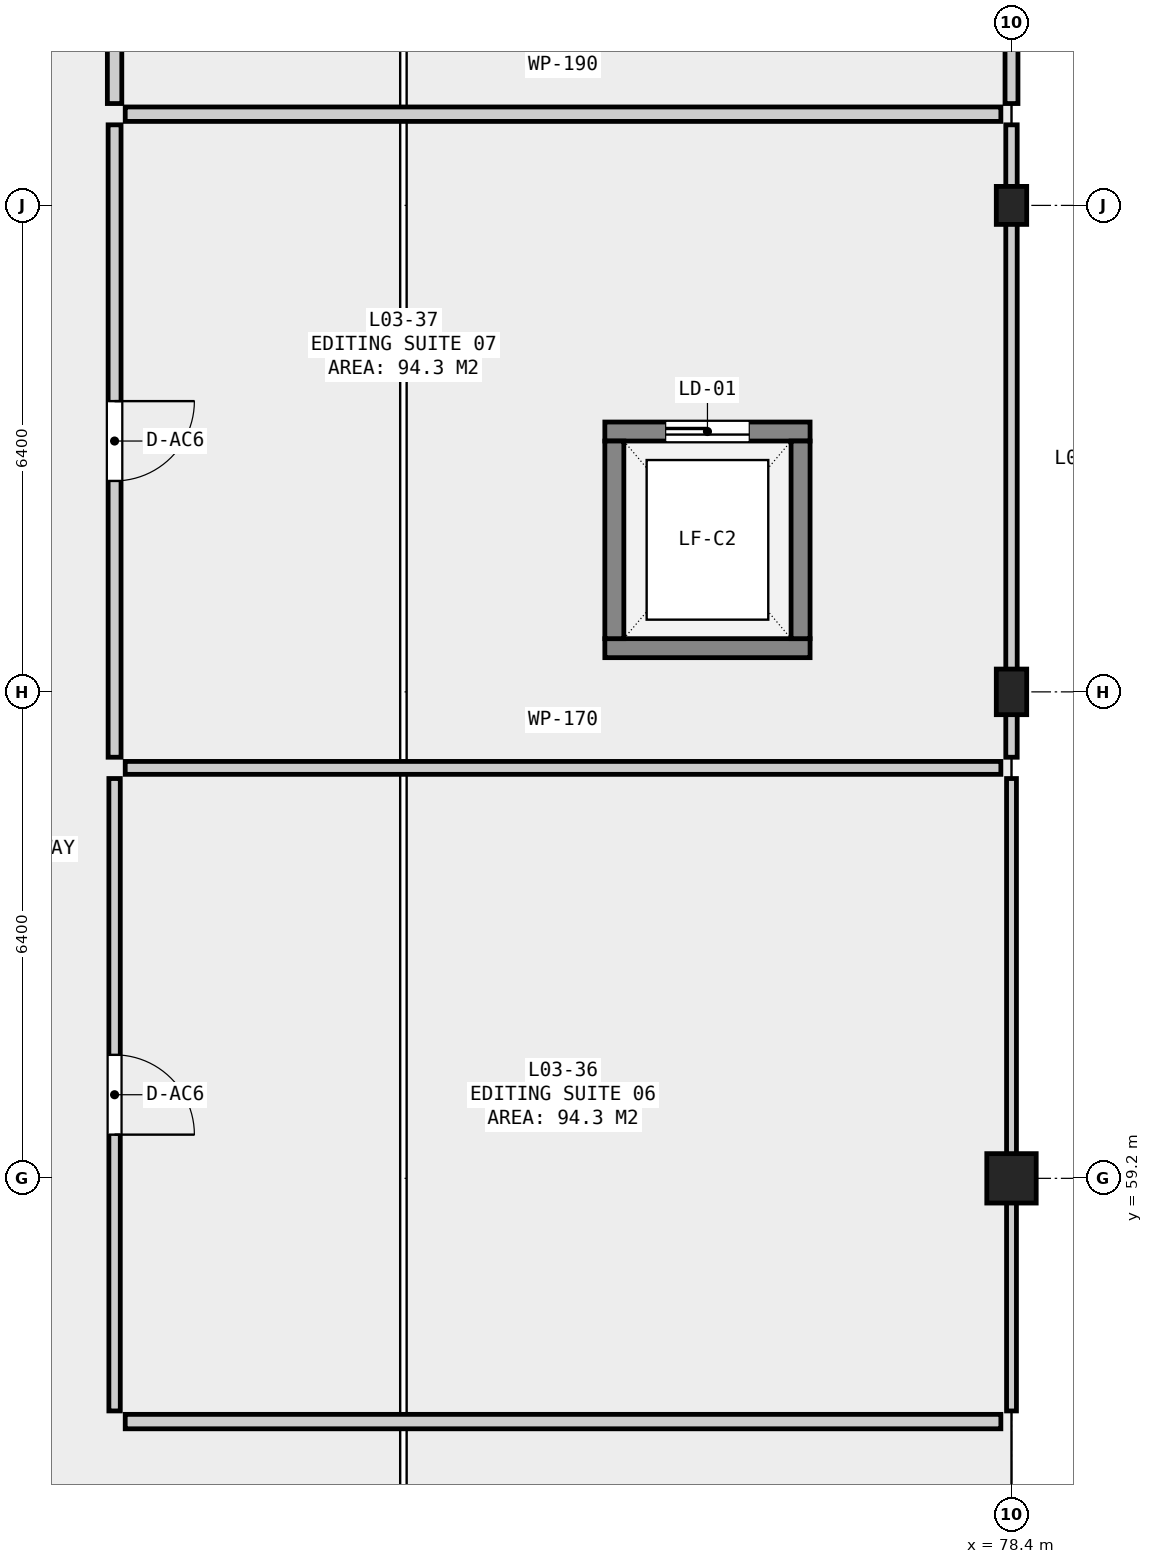
"""IFC4 building model, lengths in metres.
Left out: names, types, materials, properties, quantities, classifications, styles, units other than length and angle.
Written with IfcOpenShell. Run it as: python <this file> out.ifc"""

import sys

from ifc_helpers import new_model, si_unit, direction, frame, frame_2d, origin, origin_2d, place, context, subcontext, project, spatial, rectangle, extrude, element, fill, save


model = new_model("IFC4")
c1 = context("Model", 3, precision=1e-05, world=origin(), true_north=direction((0.0, 1.0)))
c2 = subcontext(c1, "Body", "Model", "MODEL_VIEW")
j1 = project(units=[si_unit("LENGTHUNIT", "METRE"), si_unit("PLANEANGLEUNIT", "RADIAN")], contexts=[c1])
p1 = place(None, origin())
s1 = spatial("IfcSite", under=j1, at=p1, CompositionType="ELEMENT")
p2 = place(p1, origin())
s2 = spatial("IfcBuilding", under=s1, at=p2, CompositionType="ELEMENT")
p3 = place(p2, frame((0.0, 0.0, 15.6)))
s3 = spatial("IfcBuildingStorey", under=s2, at=p3, CompositionType="ELEMENT", Elevation=15.6)
p4 = place(p3, frame((78.4, 59.2, 0.0), z_axis=(0.0, 0.0, 1.0), x_axis=(1.0, 0.0, 0.0)))
e1 = element("IfcColumn", 1, at=p4, inside=s3, PredefinedType="COLUMN", context=c2, shape_type="SweptSolid", body=[
    extrude(rectangle(XDim=0.65, YDim=0.65, at=origin_2d()), origin(), (0.0, 0.0, 1.0), 4.2),
])
p5 = place(p3, frame((78.4, 65.6, 0.0), z_axis=(0.0, 0.0, 1.0), x_axis=(1.0, 0.0, 0.0)))
e2 = element("IfcColumn", 2, at=p5, inside=s3, PredefinedType="COLUMN", context=c2, shape_type="SweptSolid", body=[
    extrude(rectangle(XDim=0.4, YDim=0.6, at=origin_2d()), origin(), (0.0, 0.0, 1.0), 4.2),
])
p6 = place(p3, frame((78.4, 72.0, 0.0), z_axis=(0.0, 0.0, 1.0), x_axis=(1.0, 0.0, 0.0)))
e3 = element("IfcColumn", 3, at=p6, inside=s3, PredefinedType="COLUMN", context=c2, shape_type="SweptSolid", body=[
    extrude(rectangle(XDim=0.4, YDim=0.5, at=origin_2d()), origin(), (0.0, 0.0, 1.0), 4.2),
])
p7 = place(p3, frame((73.05, 66.175, 0.0), z_axis=(0.0, 0.0, 1.0), x_axis=(1.0, 0.0, 0.0)))
e4 = element("IfcWall", 4, at=p7, inside=s3, PredefinedType="SHEAR", context=c2, shape_type="SweptSolid", body=[
    extrude(rectangle(XDim=2.7, YDim=0.25, at=frame_2d((1.35, 0.0))), origin(), (0.0, 0.0, 1.0), 3.9),
])
p8 = place(p3, frame((73.05, 69.025, 0.0), z_axis=(0.0, 0.0, 1.0), x_axis=(1.0, 0.0, 0.0)))
e5 = element("IfcWall", 5, at=p8, inside=s3, PredefinedType="SHEAR", context=c2, shape_type="SweptSolid", body=[
    extrude(rectangle(XDim=2.7, YDim=0.25, at=frame_2d((1.35, 0.0))), origin(), (0.0, 0.0, 1.0), 3.9),
])
p9 = place(p8, frame((0.8, 0.0, 0.0)))
e6 = element("IfcOpeningElement", 6, at=p9, cuts=e5, PredefinedType="OPENING", context=c2, shape_type="SweptSolid", body=[
    extrude(rectangle(XDim=1.1, YDim=2.15, at=frame_2d((0.55, 1.075))), frame((0.0, 0.137, 0.0), z_axis=(0.0, -1.0, 0.0), x_axis=(1.0, 0.0, 0.0)), (0.0, 0.0, 1.0), 0.274),
])
for number, where, z_axis, x_axis in (
    (7, (73.175, 66.3, 0.0), (0.0, 0.0, 1.0), (0.0, 1.0, 0.0)),
    (8, (75.625, 66.3, 0.0), (0.0, 0.0, 1.0), (0.0, 1.0, 0.0)),
):
    element("IfcWall", number, at=place(p3, frame(where, z_axis=z_axis, x_axis=x_axis)), inside=s3, PredefinedType="SHEAR", context=c2, shape_type="SweptSolid", body=[
        extrude(rectangle(XDim=2.6, YDim=0.25, at=frame_2d((1.3, 0.0))), origin(), (0.0, 0.0, 1.0), 3.9),
    ])
p10 = place(p3, frame((66.74, 56.0, 0.0), z_axis=(0.0, 0.0, 1.0), x_axis=(1.0, 0.0, 0.0)))
e9 = element("IfcWall", 9, at=p10, inside=s3, PredefinedType="PARTITIONING", context=c2, shape_type="SweptSolid", body=[
    extrude(rectangle(XDim=11.52, YDim=0.19, at=frame_2d((5.76, 0.0))), origin(), (0.0, 0.0, 1.0), 3.9),
])
p11 = place(p3, frame((66.74, 64.6, 0.0), z_axis=(0.0, 0.0, 1.0), x_axis=(1.0, 0.0, 0.0)))
e10 = element("IfcWall", 10, at=p11, inside=s3, PredefinedType="PARTITIONING", context=c2, shape_type="SweptSolid", body=[
    extrude(rectangle(XDim=11.52, YDim=0.17, at=frame_2d((5.76, 0.0))), origin(), (0.0, 0.0, 1.0), 3.9),
])
p12 = place(p3, frame((66.6, 56.14, 0.0), z_axis=(0.0, 0.0, 1.0), x_axis=(0.0, 1.0, 0.0)))
e11 = element("IfcWall", 11, at=p12, inside=s3, PredefinedType="PARTITIONING", context=c2, shape_type="SweptSolid", body=[
    extrude(rectangle(XDim=8.32, YDim=0.15, at=frame_2d((4.16, 0.0))), origin(), (0.0, 0.0, 1.0), 3.9),
])
p13 = place(p12, frame((3.635, 0.0, 0.0)))
e12 = element("IfcOpeningElement", 12, at=p13, cuts=e11, PredefinedType="OPENING", context=c2, shape_type="SweptSolid", body=[
    extrude(rectangle(XDim=1.05, YDim=2.15, at=frame_2d((0.525, 1.075))), frame((0.0, 0.087, 0.0), z_axis=(0.0, -1.0, 0.0), x_axis=(1.0, 0.0, 0.0)), (0.0, 0.0, 1.0), 0.174),
])
p14 = place(p3, frame((78.4, 56.14, 0.0), z_axis=(0.0, 0.0, 1.0), x_axis=(0.0, 1.0, 0.0)))
e13 = element("IfcWall", 13, at=p14, inside=s3, PredefinedType="PARTITIONING", context=c2, shape_type="SweptSolid", body=[
    extrude(rectangle(XDim=8.32, YDim=0.13, at=frame_2d((4.16, 0.0))), origin(), (0.0, 0.0, 1.0), 3.3),
])
p15 = place(p3, frame((66.74, 73.2, 0.0), z_axis=(0.0, 0.0, 1.0), x_axis=(1.0, 0.0, 0.0)))
e14 = element("IfcWall", 14, at=p15, inside=s3, PredefinedType="PARTITIONING", context=c2, shape_type="SweptSolid", body=[
    extrude(rectangle(XDim=11.52, YDim=0.19, at=frame_2d((5.76, 0.0))), origin(), (0.0, 0.0, 1.0), 3.9),
])
p16 = place(p3, frame((66.6, 64.74, 0.0), z_axis=(0.0, 0.0, 1.0), x_axis=(0.0, 1.0, 0.0)))
e15 = element("IfcWall", 15, at=p16, inside=s3, PredefinedType="PARTITIONING", context=c2, shape_type="SweptSolid", body=[
    extrude(rectangle(XDim=8.32, YDim=0.17, at=frame_2d((4.16, 0.0))), origin(), (0.0, 0.0, 1.0), 3.9),
])
p17 = place(p16, frame((3.635, 0.0, 0.0)))
e16 = element("IfcOpeningElement", 16, at=p17, cuts=e15, PredefinedType="OPENING", context=c2, shape_type="SweptSolid", body=[
    extrude(rectangle(XDim=1.05, YDim=2.15, at=frame_2d((0.525, 1.075))), frame((0.0, 0.097, 0.0), z_axis=(0.0, -1.0, 0.0), x_axis=(1.0, 0.0, 0.0)), (0.0, 0.0, 1.0), 0.194),
])
p18 = place(p3, frame((78.4, 64.74, 0.0), z_axis=(0.0, 0.0, 1.0), x_axis=(0.0, 1.0, 0.0)))
e17 = element("IfcWall", 17, at=p18, inside=s3, PredefinedType="PARTITIONING", context=c2, shape_type="SweptSolid", body=[
    extrude(rectangle(XDim=8.32, YDim=0.15, at=frame_2d((4.16, 0.0))), origin(), (0.0, 0.0, 1.0), 3.3),
])
p19 = place(p3, frame((66.6, 73.34, 0.0), z_axis=(0.0, 0.0, 1.0), x_axis=(0.0, 1.0, 0.0)))
e18 = element("IfcWall", 18, at=p19, inside=s3, PredefinedType="PARTITIONING", context=c2, shape_type="SweptSolid", body=[
    extrude(rectangle(XDim=8.32, YDim=0.19, at=frame_2d((4.16, 0.0))), origin(), (0.0, 0.0, 1.0), 3.9),
])
p20 = place(p19, frame((3.635, 0.0, 0.0)))
e19 = element("IfcOpeningElement", 19, at=p20, cuts=e18, PredefinedType="OPENING", context=c2, shape_type="SweptSolid", body=[
    extrude(rectangle(XDim=1.05, YDim=2.15, at=frame_2d((0.525, 1.075))), frame((0.0, 0.107, 0.0), z_axis=(0.0, -1.0, 0.0), x_axis=(1.0, 0.0, 0.0)), (0.0, 0.0, 1.0), 0.214),
])
p21 = place(p3, frame((78.4, 73.34, 0.0), z_axis=(0.0, 0.0, 1.0), x_axis=(0.0, 1.0, 0.0)))
e20 = element("IfcWall", 20, at=p21, inside=s3, PredefinedType="PARTITIONING", context=c2, shape_type="SweptSolid", body=[
    extrude(rectangle(XDim=8.32, YDim=0.17, at=frame_2d((4.16, 0.0))), origin(), (0.0, 0.0, 1.0), 3.3),
])
p22 = place(p9, origin())
e21 = element("IfcDoor", 21, at=p22, inside=s3, OperationType="SLIDING_TO_LEFT", PredefinedType="DOOR", context=c2, shape_type="SweptSolid", body=[
    extrude(rectangle(XDim=1.1, YDim=2.15, at=frame_2d((0.55, 1.075))), frame((0.0, 0.025, 0.0), z_axis=(0.0, -1.0, 0.0), x_axis=(1.0, 0.0, 0.0)), (0.0, 0.0, 1.0), 0.05),
])
fill(e6, e21)
p23 = place(p13, frame((1.05, 0.0, 0.0), z_axis=(0.0, 0.0, 1.0), x_axis=(-1.0, 0.0, 0.0)))
e22 = element("IfcDoor", 22, at=p23, inside=s3, OperationType="SINGLE_SWING_RIGHT", PredefinedType="DOOR", context=c2, shape_type="SweptSolid", body=[
    extrude(rectangle(XDim=1.05, YDim=2.15, at=frame_2d((0.525, 1.075))), frame((0.0, 0.025, 0.0), z_axis=(0.0, -1.0, 0.0), x_axis=(1.0, 0.0, 0.0)), (0.0, 0.0, 1.0), 0.05),
])
fill(e12, e22)
p24 = place(p17, frame((1.05, 0.0, 0.0), z_axis=(0.0, 0.0, 1.0), x_axis=(-1.0, 0.0, 0.0)))
e23 = element("IfcDoor", 23, at=p24, inside=s3, OperationType="SINGLE_SWING_LEFT", PredefinedType="DOOR", context=c2, shape_type="SweptSolid", body=[
    extrude(rectangle(XDim=1.05, YDim=2.15, at=frame_2d((0.525, 1.075))), frame((0.0, 0.025, 0.0), z_axis=(0.0, -1.0, 0.0), x_axis=(1.0, 0.0, 0.0)), (0.0, 0.0, 1.0), 0.05),
])
fill(e16, e23)
save(model, sys.argv[1])
